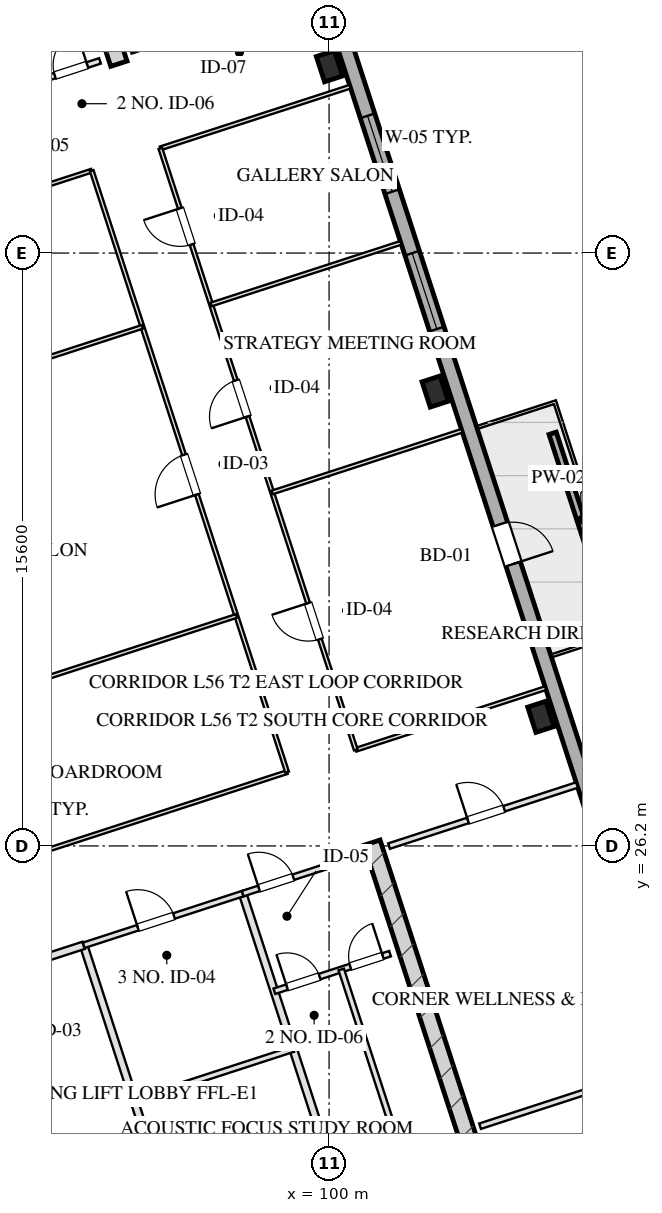
"""IFC4 building model, lengths in metres.
Left out: names, types, materials, properties, quantities, classifications, styles, units other than length and angle.
Written with IfcOpenShell. Run it as: python <this file> out.ifc"""

import sys

from ifc_helpers import new_model, si_unit, direction, frame, frame_2d, origin, origin_2d, place, context, subcontext, project, spatial, rectangle, hollow_rectangle, extrude, element, fill, save


model = new_model("IFC4")
c1 = context("Model", 3, precision=1e-05, world=origin(), true_north=direction((0.0, 1.0)))
c2 = subcontext(c1, "Body", "Model", "MODEL_VIEW")
j1 = project(units=[si_unit("LENGTHUNIT", "METRE"), si_unit("PLANEANGLEUNIT", "RADIAN")], contexts=[c1])
p1 = place(None, origin())
s1 = spatial("IfcSite", under=j1, at=p1, CompositionType="ELEMENT")
p2 = place(p1, origin())
s2 = spatial("IfcBuilding", under=s1, at=p2, CompositionType="ELEMENT")
p3 = place(p2, frame((0.0, 0.0, 209.3)))
s3 = spatial("IfcBuildingStorey", under=s2, at=p3, CompositionType="ELEMENT", Elevation=209.3)
p4 = place(p3, frame((101.128, 26.286, 0.0), z_axis=(0.0, 0.0, 1.0), x_axis=(0.309004419953, -0.951060601881, 0.0)))
e1 = element("IfcWall", 1, at=p4, inside=s3, PredefinedType="SHEAR", context=c2, shape_type="SweptSolid", body=[
    extrude(rectangle(XDim=9.33, YDim=0.45, at=frame_2d((4.665, 0.0))), origin(), (0.0, 0.0, 1.0), 3.45),
])
p5 = place(p3, frame((90.486, 20.594, 0.0), z_axis=(0.0, 0.0, 1.0), x_axis=(0.309020428229, -0.951055400562, 0.0)))
e2 = element("IfcWall", 2, at=p5, inside=s3, PredefinedType="SHEAR", context=c2, shape_type="SweptSolid", body=[
    extrude(rectangle(XDim=6.98, YDim=0.35, at=frame_2d((3.49, 0.0))), origin(), (0.0, 0.0, 1.0), 3.45),
])
p6 = place(p3, frame((94.469, 46.781, 0.0), z_axis=(0.0, 0.0, 1.0), x_axis=(-0.309004419953, 0.951060601881, 0.0)))
e3 = element("IfcWall", 3, at=p6, inside=s3, PredefinedType="SHEAR", context=c2, shape_type="SweptSolid", body=[
    extrude(rectangle(XDim=9.33, YDim=0.45, at=frame_2d((4.665, 0.0))), origin(), (0.0, 0.0, 1.0), 3.45),
])
for number, where, z_axis, x_axis in (
    (4, (105.573, 29.597, 0.0), (0.0, 0.0, 1.0), (0.951, 0.309, 0.0)),
    (5, (102.792, 38.156, 0.0), (0.0, 0.0, 1.0), (0.951, 0.309, 0.0)),
    (6, (100.01, 46.716, 0.0), (0.0, 0.0, 1.0), (0.951, 0.309, 0.0)),
):
    element("IfcColumn", number, at=place(p3, frame(where, z_axis=z_axis, x_axis=x_axis)), inside=s3, PredefinedType="COLUMN", context=c2, shape_type="SweptSolid", body=[
        extrude(hollow_rectangle(XDim=0.5, YDim=0.7, WallThickness=0.025, at=origin_2d()), origin(), (0.0, 0.0, 1.0), 3.451),
    ])
p7 = place(p3, frame((97.382, 56.586, 0.0), z_axis=(0.0, 0.0, 1.0), x_axis=(0.309016491071, -0.951056679828, 0.0)))
e7 = element("IfcWall", 7, at=p7, inside=s3, PredefinedType="SOLIDWALL", context=c2, shape_type="SweptSolid", body=[
    extrude(rectangle(XDim=38.4, YDim=0.4, at=frame_2d((19.2, 0.0))), origin(), (0.0, 0.0, 1.0), 2.61),
])
p8 = place(p7, frame((15.55, 0.0, 0.75)))
e8 = element("IfcOpeningElement", 8, at=p8, cuts=e7, PredefinedType="OPENING", context=c2, shape_type="SweptSolid", body=[
    extrude(rectangle(XDim=2.1, YDim=1.46, at=frame_2d((1.05, 0.73))), frame((0.0, 0.21, 0.0), z_axis=(0.0, -1.0, 0.0), x_axis=(1.0, 0.0, 0.0)), (0.0, 0.0, 1.0), 0.42),
])
p9 = place(p7, frame((11.75, 0.0, 0.75)))
e9 = element("IfcOpeningElement", 9, at=p9, cuts=e7, PredefinedType="OPENING", context=c2, shape_type="SweptSolid", body=[
    extrude(rectangle(XDim=2.1, YDim=1.46, at=frame_2d((1.05, 0.73))), frame((0.0, 0.21, 0.0), z_axis=(0.0, -1.0, 0.0), x_axis=(1.0, 0.0, 0.0)), (0.0, 0.0, 1.0), 0.42),
])
p10 = place(p7, frame((23.05, 0.0, 0.0)))
e10 = element("IfcOpeningElement", 10, at=p10, cuts=e7, PredefinedType="OPENING", context=c2, shape_type="SweptSolid", body=[
    extrude(rectangle(XDim=1.1, YDim=2.15, at=frame_2d((0.55, 1.075))), frame((0.0, 0.21, 0.0), z_axis=(0.0, -1.0, 0.0), x_axis=(1.0, 0.0, 0.0)), (0.0, 0.0, 1.0), 0.42),
])
p11 = place(p3, frame((107.366, 32.492, 0.0), z_axis=(0.0, 0.0, 1.0), x_axis=(-0.308986014439, 0.951066581729, 0.0)))
e11 = element("IfcWall", 11, at=p11, inside=s3, PredefinedType="PARAPET", context=c2, shape_type="SweptSolid", body=[
    extrude(rectangle(XDim=4.8, YDim=0.2, at=frame_2d((2.4, 0.0))), origin(), (0.0, 0.0, 1.0), 0.75),
])
p12 = place(p3, frame((93.542, 23.585, 0.0), z_axis=(0.0, 0.0, 1.0), x_axis=(0.309042196757, -0.951048327176, 0.0)))
e12 = element("IfcWall", 12, at=p12, inside=s3, PredefinedType="PARTITIONING", context=c2, shape_type="SweptSolid", body=[
    extrude(rectangle(XDim=8.43, YDim=0.2, at=frame_2d((4.215, 0.0))), origin(), (0.0, 0.0, 1.0), 3.175),
])
p13 = place(p3, frame((89.899, 22.401, 0.0), z_axis=(0.0, 0.0, 1.0), x_axis=(0.951046716504, 0.309047153403, 0.0)))
e13 = element("IfcWall", 13, at=p13, inside=s3, PredefinedType="PARTITIONING", context=c2, shape_type="SweptSolid", body=[
    extrude(rectangle(XDim=3.83, YDim=0.2, at=frame_2d((1.915, 0.0))), origin(), (0.0, 0.0, 1.0), 3.175),
])
p14 = place(p13, frame((1.35, 0.0, 0.0)))
e14 = element("IfcOpeningElement", 14, at=p14, cuts=e13, PredefinedType="OPENING", context=c2, shape_type="SweptSolid", body=[
    extrude(rectangle(XDim=1.2, YDim=2.05, at=frame_2d((0.6, 1.025))), frame((0.0, 0.11, 0.0), z_axis=(0.0, -1.0, 0.0), x_axis=(1.0, 0.0, 0.0)), (0.0, 0.0, 1.0), 0.22),
])
p15 = place(p3, frame((97.727, 24.944, 0.0), z_axis=(0.0, 0.0, 1.0), x_axis=(0.309016001439, -0.951056838919, 0.0)))
e15 = element("IfcWall", 15, at=p15, inside=s3, PredefinedType="PARTITIONING", context=c2, shape_type="SweptSolid", body=[
    extrude(rectangle(XDim=8.43, YDim=0.2, at=frame_2d((4.215, 0.0))), origin(), (0.0, 0.0, 1.0), 3.175),
])
p16 = place(p3, frame((93.542, 23.585, 0.0), z_axis=(0.0, 0.0, 1.0), x_axis=(0.951063829732, 0.308994485023, 0.0)))
e16 = element("IfcWall", 16, at=p16, inside=s3, PredefinedType="PARTITIONING", context=c2, shape_type="SweptSolid", body=[
    extrude(rectangle(XDim=4.4, YDim=0.15, at=frame_2d((2.2, 0.0))), origin(), (0.0, 0.0, 1.0), 3.175),
])
p17 = place(p16, frame((1.5, 0.0, 0.0)))
e17 = element("IfcOpeningElement", 17, at=p17, cuts=e16, PredefinedType="OPENING", context=c2, shape_type="SweptSolid", body=[
    extrude(rectangle(XDim=1.0, YDim=2.05, at=frame_2d((0.5, 1.025))), frame((0.0, 0.085, 0.0), z_axis=(0.0, -1.0, 0.0), x_axis=(1.0, 0.0, 0.0)), (0.0, 0.0, 1.0), 0.17),
])
p18 = place(p3, frame((94.871, 19.495, 0.0), z_axis=(0.0, 0.0, 1.0), x_axis=(0.951042223598, 0.309060979314, 0.0)))
e18 = element("IfcWall", 18, at=p18, inside=s3, PredefinedType="PARTITIONING", context=c2, shape_type="SweptSolid", body=[
    extrude(rectangle(XDim=4.4, YDim=0.15, at=frame_2d((2.2, 0.0))), origin(), (0.0, 0.0, 1.0), 3.175),
])
p19 = place(p3, frame((97.727, 24.944, 0.0), z_axis=(0.0, 0.0, 1.0), x_axis=(0.951036872128, 0.309077446369, 0.0)))
e19 = element("IfcWall", 19, at=p19, inside=s3, PredefinedType="PARTITIONING", context=c2, shape_type="SweptSolid", body=[
    extrude(rectangle(XDim=3.2, YDim=0.15, at=frame_2d((1.6, 0.0))), origin(), (0.0, 0.0, 1.0), 3.175),
])
p20 = place(p19, frame((0.45, 0.0, 0.0)))
e20 = element("IfcOpeningElement", 20, at=p20, cuts=e19, PredefinedType="OPENING", context=c2, shape_type="SweptSolid", body=[
    extrude(rectangle(XDim=0.95, YDim=2.05, at=frame_2d((0.475, 1.025))), frame((0.0, 0.085, 0.0), z_axis=(0.0, -1.0, 0.0), x_axis=(1.0, 0.0, 0.0)), (0.0, 0.0, 1.0), 0.17),
])
p21 = place(p3, frame((98.561, 22.376, 0.0), z_axis=(0.0, 0.0, 1.0), x_axis=(0.95104415986, 0.309055020985, 0.0)))
e21 = element("IfcWall", 21, at=p21, inside=s3, PredefinedType="PARTITIONING", context=c2, shape_type="SweptSolid", body=[
    extrude(rectangle(XDim=3.2, YDim=0.15, at=frame_2d((1.6, 0.0))), origin(), (0.0, 0.0, 1.0), 3.175),
])
p22 = place(p21, frame((0.35, 0.0, 0.0)))
e22 = element("IfcOpeningElement", 22, at=p22, cuts=e21, PredefinedType="OPENING", context=c2, shape_type="SweptSolid", body=[
    extrude(rectangle(XDim=0.9, YDim=2.05, at=frame_2d((0.45, 1.025))), frame((0.0, 0.085, 0.0), z_axis=(0.0, -1.0, 0.0), x_axis=(1.0, 0.0, 0.0)), (0.0, 0.0, 1.0), 0.17),
])
p23 = place(p21, frame((2.1, 0.0, 0.0)))
e23 = element("IfcOpeningElement", 23, at=p23, cuts=e21, PredefinedType="OPENING", context=c2, shape_type="SweptSolid", body=[
    extrude(rectangle(XDim=0.9, YDim=2.05, at=frame_2d((0.45, 1.025))), frame((0.0, 0.085, 0.0), z_axis=(0.0, -1.0, 0.0), x_axis=(1.0, 0.0, 0.0)), (0.0, 0.0, 1.0), 0.17),
])
p24 = place(p3, frame((100.32, 22.948, 0.0), z_axis=(0.0, 0.0, 1.0), x_axis=(0.309035009867, -0.951050662518, 0.0)))
e24 = element("IfcWall", 24, at=p24, inside=s3, PredefinedType="PARTITIONING", context=c2, shape_type="SweptSolid", body=[
    extrude(rectangle(XDim=5.73, YDim=0.15, at=frame_2d((2.865, 0.0))), origin(), (0.0, 0.0, 1.0), 3.175),
])
p25 = place(p3, frame((90.928, 45.868, 0.0), z_axis=(0.0, 0.0, 1.0), x_axis=(0.951059297078, 0.309008435874, 0.0)))
e25 = element("IfcWall", 25, at=p25, inside=s3, PredefinedType="PARTITIONING", context=c2, shape_type="SweptSolid", body=[
    extrude(rectangle(XDim=3.2, YDim=0.15, at=frame_2d((1.6, 0.0))), origin(), (0.0, 0.0, 1.0), 3.175),
])
p26 = place(p25, frame((0.22, 0.0, 0.0)))
e26 = element("IfcOpeningElement", 26, at=p26, cuts=e25, PredefinedType="OPENING", context=c2, shape_type="SweptSolid", body=[
    extrude(rectangle(XDim=0.95, YDim=2.05, at=frame_2d((0.475, 1.025))), frame((0.0, 0.085, 0.0), z_axis=(0.0, -1.0, 0.0), x_axis=(1.0, 0.0, 0.0)), (0.0, 0.0, 1.0), 0.17),
])
p27 = place(p25, frame((1.95, 0.0, 0.0)))
e27 = element("IfcOpeningElement", 27, at=p27, cuts=e25, PredefinedType="OPENING", context=c2, shape_type="SweptSolid", body=[
    extrude(rectangle(XDim=0.9, YDim=2.05, at=frame_2d((0.45, 1.025))), frame((0.0, 0.085, 0.0), z_axis=(0.0, -1.0, 0.0), x_axis=(1.0, 0.0, 0.0)), (0.0, 0.0, 1.0), 0.17),
])
p28 = place(p3, frame((103.973, 18.825, 0.0), z_axis=(0.0, 0.0, 1.0), x_axis=(0.951055112834, 0.309021313752, 0.0)))
e28 = element("IfcWall", 28, at=p28, inside=s3, PredefinedType="PARTITIONING", context=c2, shape_type="SweptSolid", body=[
    extrude(rectangle(XDim=5.2, YDim=0.15, at=frame_2d((2.6, 0.0))), origin(), (0.0, 0.0, 1.0), 3.175),
])
p29 = place(p3, frame((101.578, 26.196, 0.0), z_axis=(0.0, 0.0, 1.0), x_axis=(0.951064427824, 0.308992644131, 0.0)))
e29 = element("IfcWall", 29, at=p29, inside=s3, PredefinedType="PARTITIONING", context=c2, shape_type="SweptSolid", body=[
    extrude(rectangle(XDim=5.2, YDim=0.15, at=frame_2d((2.6, 0.0))), origin(), (0.0, 0.0, 1.0), 3.175),
])
p30 = place(p29, frame((2.184, 0.0, 0.0)))
e30 = element("IfcOpeningElement", 30, at=p30, cuts=e29, PredefinedType="OPENING", context=c2, shape_type="SweptSolid", body=[
    extrude(rectangle(XDim=1.0, YDim=2.05, at=frame_2d((0.5, 1.025))), frame((0.0, 0.085, 0.0), z_axis=(0.0, -1.0, 0.0), x_axis=(1.0, 0.0, 0.0)), (0.0, 0.0, 1.0), 0.17),
])
p31 = place(p3, frame((94.78, 47.119, 0.0), z_axis=(0.0, 0.0, 1.0), x_axis=(0.951055112834, 0.309021313752, 0.0)))
e31 = element("IfcWall", 31, at=p31, inside=s3, PredefinedType="PARTITIONING", context=c2, shape_type="SweptSolid", body=[
    extrude(rectangle(XDim=5.2, YDim=0.15, at=frame_2d((2.6, 0.0))), origin(), (0.0, 0.0, 1.0), 3.175),
])
p32 = place(p31, frame((2.184, 0.0, 0.0)))
e32 = element("IfcOpeningElement", 32, at=p32, cuts=e31, PredefinedType="OPENING", context=c2, shape_type="SweptSolid", body=[
    extrude(rectangle(XDim=1.05, YDim=2.05, at=frame_2d((0.525, 1.025))), frame((0.0, 0.085, 0.0), z_axis=(0.0, -1.0, 0.0), x_axis=(1.0, 0.0, 0.0)), (0.0, 0.0, 1.0), 0.17),
])
p33 = place(p3, frame((86.009, 23.955, 0.0), z_axis=(0.0, 0.0, 1.0), x_axis=(0.951059488241, 0.309007847517, 0.0)))
e33 = element("IfcWall", 33, at=p33, inside=s3, PredefinedType="MOVABLE", context=c2, shape_type="SweptSolid", body=[
    extrude(rectangle(XDim=13.55, YDim=0.1, at=frame_2d((6.775, 0.0))), origin(), (0.0, 0.0, 1.0), 3.175),
])
p34 = place(p3, frame((100.703, 28.729, 0.0), z_axis=(0.0, 0.0, 1.0), x_axis=(0.951055596592, 0.309019824916, 0.0)))
e34 = element("IfcWall", 34, at=p34, inside=s3, PredefinedType="MOVABLE", context=c2, shape_type="SweptSolid", body=[
    extrude(rectangle(XDim=5.25, YDim=0.1, at=frame_2d((2.625, 0.0))), origin(), (0.0, 0.0, 1.0), 3.175),
])
p35 = place(p3, frame((80.867, 39.781, 0.0), z_axis=(0.0, 0.0, 1.0), x_axis=(0.951054192928, 0.309024144872, 0.0)))
e35 = element("IfcWall", 35, at=p35, inside=s3, PredefinedType="MOVABLE", context=c2, shape_type="SweptSolid", body=[
    extrude(rectangle(XDim=13.55, YDim=0.1, at=frame_2d((6.775, 0.0))), origin(), (0.0, 0.0, 1.0), 3.175),
])
p36 = place(p3, frame((95.561, 44.555, 0.0), z_axis=(0.0, 0.0, 1.0), x_axis=(0.951055596592, 0.309019824916, 0.0)))
e36 = element("IfcWall", 36, at=p36, inside=s3, PredefinedType="MOVABLE", context=c2, shape_type="SweptSolid", body=[
    extrude(rectangle(XDim=5.25, YDim=0.1, at=frame_2d((2.625, 0.0))), origin(), (0.0, 0.0, 1.0), 3.175),
])
p37 = place(p3, frame((98.896, 28.142, 0.0), z_axis=(0.0, 0.0, 1.0), x_axis=(-0.30901773025, 0.951056277195, 0.0)))
e37 = element("IfcWall", 37, at=p37, inside=s3, PredefinedType="MOVABLE", context=c2, shape_type="SweptSolid", body=[
    extrude(rectangle(XDim=16.64, YDim=0.1, at=frame_2d((8.32, 0.0))), origin(), (0.0, 0.0, 1.0), 3.175),
])
p38 = place(p37, frame((7.68, 0.0, 0.0)))
e38 = element("IfcOpeningElement", 38, at=p38, cuts=e37, PredefinedType="OPENING", context=c2, shape_type="SweptSolid", body=[
    extrude(rectangle(XDim=1.1, YDim=2.05, at=frame_2d((0.55, 1.025))), frame((0.0, 0.06, 0.0), z_axis=(0.0, -1.0, 0.0), x_axis=(1.0, 0.0, 0.0)), (0.0, 0.0, 1.0), 0.12),
])
p39 = place(p3, frame((100.703, 28.729, 0.0), z_axis=(0.0, 0.0, 1.0), x_axis=(-0.30901773025, 0.951056277195, 0.0)))
e39 = element("IfcWall", 39, at=p39, inside=s3, PredefinedType="MOVABLE", context=c2, shape_type="SweptSolid", body=[
    extrude(rectangle(XDim=16.64, YDim=0.1, at=frame_2d((8.32, 0.0))), origin(), (0.0, 0.0, 1.0), 3.175),
])
p40 = place(p39, frame((3.06, 0.0, 0.0)))
e40 = element("IfcOpeningElement", 40, at=p40, cuts=e39, PredefinedType="OPENING", context=c2, shape_type="SweptSolid", body=[
    extrude(rectangle(XDim=1.0, YDim=2.05, at=frame_2d((0.5, 1.025))), frame((0.0, 0.06, 0.0), z_axis=(0.0, -1.0, 0.0), x_axis=(1.0, 0.0, 0.0)), (0.0, 0.0, 1.0), 0.12),
])
p41 = place(p39, frame((9.22, 0.0, 0.0)))
e41 = element("IfcOpeningElement", 41, at=p41, cuts=e39, PredefinedType="OPENING", context=c2, shape_type="SweptSolid", body=[
    extrude(rectangle(XDim=1.0, YDim=2.05, at=frame_2d((0.5, 1.025))), frame((0.0, 0.06, 0.0), z_axis=(0.0, -1.0, 0.0), x_axis=(1.0, 0.0, 0.0)), (0.0, 0.0, 1.0), 0.12),
])
p42 = place(p39, frame((13.98, 0.0, 0.0)))
e42 = element("IfcOpeningElement", 42, at=p42, cuts=e39, PredefinedType="OPENING", context=c2, shape_type="SweptSolid", body=[
    extrude(rectangle(XDim=1.0, YDim=2.05, at=frame_2d((0.5, 1.025))), frame((0.0, 0.06, 0.0), z_axis=(0.0, -1.0, 0.0), x_axis=(1.0, 0.0, 0.0)), (0.0, 0.0, 1.0), 0.12),
])
p43 = place(p3, frame((84.674, 28.063, 0.0), z_axis=(0.0, 0.0, 1.0), x_axis=(0.951054192928, 0.309024144872, 0.0)))
e43 = element("IfcWall", 43, at=p43, inside=s3, PredefinedType="MOVABLE", context=c2, shape_type="SweptSolid", body=[
    extrude(rectangle(XDim=13.55, YDim=0.1, at=frame_2d((6.775, 0.0))), origin(), (0.0, 0.0, 1.0), 3.175),
])
p44 = place(p3, frame((82.202, 35.672, 0.0), z_axis=(0.0, 0.0, 1.0), x_axis=(0.951059488241, 0.309007847517, 0.0)))
e44 = element("IfcWall", 44, at=p44, inside=s3, PredefinedType="MOVABLE", context=c2, shape_type="SweptSolid", body=[
    extrude(rectangle(XDim=13.55, YDim=0.1, at=frame_2d((6.775, 0.0))), origin(), (0.0, 0.0, 1.0), 3.175),
])
for number, where, z_axis, x_axis in (
    (45, (98.502, 35.501, 0.0), (0.0, 0.0, 1.0), (0.951, 0.309, 0.0)),
    (46, (96.896, 40.446, 0.0), (0.0, 0.0, 1.0), (0.951, 0.309, 0.0)),
):
    element("IfcWall", number, at=place(p3, frame(where, z_axis=z_axis, x_axis=x_axis)), inside=s3, PredefinedType="MOVABLE", context=c2, shape_type="SweptSolid", body=[
        extrude(rectangle(XDim=5.25, YDim=0.1, at=frame_2d((2.625, 0.0))), origin(), (0.0, 0.0, 1.0), 3.175),
    ])
p45 = place(p8, origin())
e47 = element("IfcWindow", 47, at=p45, inside=s3, PartitioningType="TRIPLE_PANEL_VERTICAL", PredefinedType="WINDOW", context=c2, shape_type="SweptSolid", body=[
    extrude(rectangle(XDim=2.1, YDim=1.46, at=frame_2d((1.05, 0.73))), frame((0.0, 0.03, 0.0), z_axis=(0.0, -1.0, 0.0), x_axis=(1.0, 0.0, 0.0)), (0.0, 0.0, 1.0), 0.06),
])
fill(e8, e47)
p46 = place(p9, origin())
e48 = element("IfcWindow", 48, at=p46, inside=s3, PartitioningType="TRIPLE_PANEL_VERTICAL", PredefinedType="WINDOW", context=c2, shape_type="SweptSolid", body=[
    extrude(rectangle(XDim=2.1, YDim=1.46, at=frame_2d((1.05, 0.73))), frame((0.0, 0.03, 0.0), z_axis=(0.0, -1.0, 0.0), x_axis=(1.0, 0.0, 0.0)), (0.0, 0.0, 1.0), 0.06),
])
fill(e9, e48)
p47 = place(p10, origin())
e49 = element("IfcDoor", 49, at=p47, inside=s3, OperationType="SINGLE_SWING_RIGHT", PredefinedType="DOOR", context=c2, shape_type="SweptSolid", body=[
    extrude(rectangle(XDim=1.1, YDim=2.15, at=frame_2d((0.55, 1.075))), frame((0.0, 0.025, 0.0), z_axis=(0.0, -1.0, 0.0), x_axis=(1.0, 0.0, 0.0)), (0.0, 0.0, 1.0), 0.05),
])
fill(e10, e49)
p48 = place(p17, origin())
e50 = element("IfcDoor", 50, at=p48, inside=s3, OperationType="SINGLE_SWING_LEFT", PredefinedType="DOOR", context=c2, shape_type="SweptSolid", body=[
    extrude(rectangle(XDim=1.0, YDim=2.05, at=frame_2d((0.5, 1.025))), frame((0.0, 0.025, 0.0), z_axis=(0.0, -1.0, 0.0), x_axis=(1.0, 0.0, 0.0)), (0.0, 0.0, 1.0), 0.05),
])
fill(e17, e50)
p49 = place(p20, origin())
e51 = element("IfcDoor", 51, at=p49, inside=s3, OperationType="SINGLE_SWING_LEFT", PredefinedType="DOOR", context=c2, shape_type="SweptSolid", body=[
    extrude(rectangle(XDim=0.95, YDim=2.05, at=frame_2d((0.475, 1.025))), frame((0.0, 0.025, 0.0), z_axis=(0.0, -1.0, 0.0), x_axis=(1.0, 0.0, 0.0)), (0.0, 0.0, 1.0), 0.05),
])
fill(e20, e51)
p50 = place(p22, origin())
e52 = element("IfcDoor", 52, at=p50, inside=s3, OperationType="SINGLE_SWING_LEFT", PredefinedType="DOOR", context=c2, shape_type="SweptSolid", body=[
    extrude(rectangle(XDim=0.9, YDim=2.05, at=frame_2d((0.45, 1.025))), frame((0.0, 0.025, 0.0), z_axis=(0.0, -1.0, 0.0), x_axis=(1.0, 0.0, 0.0)), (0.0, 0.0, 1.0), 0.05),
])
fill(e22, e52)
p51 = place(p23, origin())
e53 = element("IfcDoor", 53, at=p51, inside=s3, OperationType="SINGLE_SWING_RIGHT", PredefinedType="DOOR", context=c2, shape_type="SweptSolid", body=[
    extrude(rectangle(XDim=0.9, YDim=2.05, at=frame_2d((0.45, 1.025))), frame((0.0, 0.025, 0.0), z_axis=(0.0, -1.0, 0.0), x_axis=(1.0, 0.0, 0.0)), (0.0, 0.0, 1.0), 0.05),
])
fill(e23, e53)
p52 = place(p27, origin())
e54 = element("IfcDoor", 54, at=p52, inside=s3, OperationType="SINGLE_SWING_RIGHT", PredefinedType="DOOR", context=c2, shape_type="SweptSolid", body=[
    extrude(rectangle(XDim=0.9, YDim=2.05, at=frame_2d((0.45, 1.025))), frame((0.0, 0.025, 0.0), z_axis=(0.0, -1.0, 0.0), x_axis=(1.0, 0.0, 0.0)), (0.0, 0.0, 1.0), 0.05),
])
fill(e27, e54)
p53 = place(p30, origin())
e55 = element("IfcDoor", 55, at=p53, inside=s3, OperationType="SINGLE_SWING_LEFT", PredefinedType="DOOR", context=c2, shape_type="SweptSolid", body=[
    extrude(rectangle(XDim=1.0, YDim=2.05, at=frame_2d((0.5, 1.025))), frame((0.0, 0.025, 0.0), z_axis=(0.0, -1.0, 0.0), x_axis=(1.0, 0.0, 0.0)), (0.0, 0.0, 1.0), 0.05),
])
fill(e30, e55)
p54 = place(p38, origin())
e56 = element("IfcDoor", 56, at=p54, inside=s3, OperationType="SINGLE_SWING_LEFT", PredefinedType="DOOR", context=c2, shape_type="SweptSolid", body=[
    extrude(rectangle(XDim=1.1, YDim=2.05, at=frame_2d((0.55, 1.025))), frame((0.0, 0.025, 0.0), z_axis=(0.0, -1.0, 0.0), x_axis=(1.0, 0.0, 0.0)), (0.0, 0.0, 1.0), 0.05),
])
fill(e38, e56)
p55 = place(p40, origin())
e57 = element("IfcDoor", 57, at=p55, inside=s3, OperationType="SINGLE_SWING_RIGHT", PredefinedType="DOOR", context=c2, shape_type="SweptSolid", body=[
    extrude(rectangle(XDim=1.0, YDim=2.05, at=frame_2d((0.5, 1.025))), frame((0.0, 0.025, 0.0), z_axis=(0.0, -1.0, 0.0), x_axis=(1.0, 0.0, 0.0)), (0.0, 0.0, 1.0), 0.05),
])
fill(e40, e57)
p56 = place(p41, origin())
e58 = element("IfcDoor", 58, at=p56, inside=s3, OperationType="SINGLE_SWING_LEFT", PredefinedType="DOOR", context=c2, shape_type="SweptSolid", body=[
    extrude(rectangle(XDim=1.0, YDim=2.05, at=frame_2d((0.5, 1.025))), frame((0.0, 0.025, 0.0), z_axis=(0.0, -1.0, 0.0), x_axis=(1.0, 0.0, 0.0)), (0.0, 0.0, 1.0), 0.05),
])
fill(e41, e58)
p57 = place(p42, origin())
e59 = element("IfcDoor", 59, at=p57, inside=s3, OperationType="SINGLE_SWING_RIGHT", PredefinedType="DOOR", context=c2, shape_type="SweptSolid", body=[
    extrude(rectangle(XDim=1.0, YDim=2.05, at=frame_2d((0.5, 1.025))), frame((0.0, 0.025, 0.0), z_axis=(0.0, -1.0, 0.0), x_axis=(1.0, 0.0, 0.0)), (0.0, 0.0, 1.0), 0.05),
])
fill(e42, e59)
save(model, sys.argv[1])
